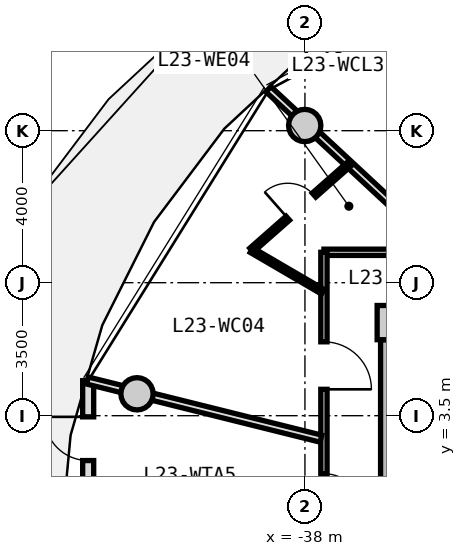
"""IFC4 building model, lengths in metres.
Left out: names, types, materials, properties, quantities, classifications, styles, units other than length and angle.
Written with IfcOpenShell. Run it as: python <this file> out.ifc"""

import sys

from ifc_helpers import new_model, si_unit, direction, frame, frame_2d, origin, origin_2d, place, context, subcontext, project, spatial, rectangle, circle, extrude, source, transform, mapped, element, fill, save


model = new_model("IFC4")
c1 = context("Model", 3, precision=1e-05, world=origin(), true_north=direction((0.0, 1.0)))
c2 = subcontext(c1, "Body", "Model", "MODEL_VIEW")
j1 = project(units=[si_unit("LENGTHUNIT", "METRE"), si_unit("PLANEANGLEUNIT", "RADIAN")], contexts=[c1])
p1 = place(None, origin())
s1 = spatial("IfcSite", under=j1, at=p1, CompositionType="ELEMENT")
p2 = place(p1, origin())
s2 = spatial("IfcBuilding", under=s1, at=p2, CompositionType="ELEMENT")
p3 = place(p2, frame((0.0, 0.0, 77.95)))
s3 = spatial("IfcBuildingStorey", under=s2, at=p3, CompositionType="ELEMENT", Elevation=77.95)
m1 = source(origin(), c2, "Body", "SweptSolid", [
    extrude(rectangle(XDim=0.9, YDim=0.9, at=origin_2d()), origin(), (0.0, 0.0, 1.0), 3.05),
])
p4 = place(p3, frame((-35.65, 5.95, 0.0), z_axis=(0.0, 0.0, 1.0), x_axis=(1.0, 0.0, 0.0)))
e1 = element("IfcColumn", 1, at=p4, inside=s3, PredefinedType="COLUMN", context=c2, shape_type="MappedRepresentation", body=[
    mapped(m1, transform((0.0, 0.0, 0.0), x_axis=(1.0, 0.0, 0.0), y_axis=(0.0, 1.0, 0.0), z_axis=(0.0, 0.0, 1.0), scale=1.0)),
])
m2 = source(origin(), c2, "Body", "SweptSolid", [
    extrude(rectangle(XDim=11.0, YDim=0.72, at=frame_2d((5.5, 0.0))), origin(), (0.0, 0.0, 1.0), 2.79),
])
p5 = place(p3, frame((-35.65, -5.5, 0.0), z_axis=(0.0, 0.0, 1.0), x_axis=(0.0, 1.0, 0.0)))
e2 = element("IfcWall", 2, at=p5, inside=s3, PredefinedType="SHEAR", context=c2, shape_type="MappedRepresentation", body=[
    mapped(m2, transform((0.0, 0.0, 0.0), x_axis=(1.0, 0.0, 0.0), y_axis=(0.0, 1.0, 0.0), z_axis=(0.0, 0.0, 1.0), scale=1.0)),
])
p6 = place(p5, frame((3.8, 0.0, 0.0)))
e3 = element("IfcOpeningElement", 3, at=p6, cuts=e2, PredefinedType="OPENING", context=c2, shape_type="SweptSolid", body=[
    extrude(rectangle(XDim=1.2, YDim=2.15, at=frame_2d((0.6, 1.075))), frame((0.0, 0.37, 0.0), z_axis=(0.0, -1.0, 0.0), x_axis=(1.0, 0.0, 0.0)), (0.0, 0.0, 1.0), 0.74),
])
m3 = source(origin(), c2, "Body", "SweptSolid", [
    extrude(circle(Radius=0.425, at=origin_2d()), origin(), (0.0, 0.0, 1.0), 3.47),
])
for number, where, z_axis, x_axis in (
    (4, (-38.006, 11.137, -0.42), (0.0, 0.0, 1.0), (1.0, 0.0, 0.0)),
    (5, (-42.419, 4.076, -0.42), (0.0, 0.0, 1.0), (1.0, 0.0, 0.0)),
):
    element("IfcColumn", number, at=place(p3, frame(where, z_axis=z_axis, x_axis=x_axis)), inside=s3, PredefinedType="COLUMN", context=c2, shape_type="MappedRepresentation", body=[
        mapped(m3, transform((0.0, 0.0, 0.0), x_axis=(1.0, 0.0, 0.0), y_axis=(0.0, 1.0, 0.0), z_axis=(0.0, 0.0, 1.0), scale=1.0)),
    ])
m4 = source(origin(), c2, "Body", "SweptSolid", [
    extrude(rectangle(XDim=8.841, YDim=0.29, at=frame_2d((4.421, 0.0))), origin(), (0.0, 0.0, 1.0), 2.79),
])
p7 = place(p3, frame((-43.704, -4.421, 0.0), z_axis=(0.0, 0.0, 1.0), x_axis=(0.0, 1.0, 0.0)))
e6 = element("IfcWall", 6, at=p7, inside=s3, PredefinedType="SOLIDWALL", context=c2, shape_type="MappedRepresentation", body=[
    mapped(m4, transform((0.0, 0.0, 0.0), x_axis=(1.0, 0.0, 0.0), y_axis=(0.0, 1.0, 0.0), z_axis=(0.0, 0.0, 1.0), scale=1.0)),
])
p8 = place(p7, frame((6.74, 0.0, 0.0)))
e7 = element("IfcOpeningElement", 7, at=p8, cuts=e6, PredefinedType="OPENING", context=c2, shape_type="SweptSolid", body=[
    extrude(rectangle(XDim=1.15, YDim=2.25, at=frame_2d((0.575, 1.125))), frame((0.0, 0.155, 0.0), z_axis=(0.0, -1.0, 0.0), x_axis=(1.0, 0.0, 0.0)), (0.0, 0.0, 1.0), 0.31),
])
p9 = place(p7, frame((0.85, 0.0, 0.85)))
e8 = element("IfcOpeningElement", 8, at=p9, cuts=e6, PredefinedType="OPENING", context=c2, shape_type="SweptSolid", body=[
    extrude(rectangle(XDim=1.2, YDim=1.5, at=frame_2d((0.6, 0.75))), frame((0.0, 0.155, 0.0), z_axis=(0.0, -1.0, 0.0), x_axis=(1.0, 0.0, 0.0)), (0.0, 0.0, 1.0), 0.31),
])
m5 = source(origin(), c2, "Body", "SweptSolid", [
    extrude(rectangle(XDim=19.0, YDim=0.165, at=frame_2d((9.5, 0.0))), origin(), (0.0, 0.0, 1.0), 2.775),
])
p10 = place(p3, frame((-37.5, 7.8, 0.0), z_axis=(0.0, 0.0, 1.0), x_axis=(1.0, 0.0, 0.0)))
e9 = element("IfcWall", 9, at=p10, inside=s3, PredefinedType="PARTITIONING", context=c2, shape_type="MappedRepresentation", body=[
    mapped(m5, transform((0.0, 0.0, 0.0), x_axis=(1.0, 0.0, 0.0), y_axis=(0.0, 1.0, 0.0), z_axis=(0.0, 0.0, 1.0), scale=1.0)),
])
p11 = place(p10, frame((15.644, 0.0, 0.0)))
e10 = element("IfcOpeningElement", 10, at=p11, cuts=e9, PredefinedType="OPENING", context=c2, shape_type="SweptSolid", body=[
    extrude(rectangle(XDim=1.25, YDim=2.2, at=frame_2d((0.625, 1.1))), frame((0.0, 0.093, 0.0), z_axis=(0.0, -1.0, 0.0), x_axis=(1.0, 0.0, 0.0)), (0.0, 0.0, 1.0), 0.185),
])
p12 = place(p10, frame((11.402, 0.0, 0.0)))
e11 = element("IfcOpeningElement", 11, at=p12, cuts=e9, PredefinedType="OPENING", context=c2, shape_type="SweptSolid", body=[
    extrude(rectangle(XDim=1.05, YDim=2.15, at=frame_2d((0.525, 1.075))), frame((0.0, 0.093, 0.0), z_axis=(0.0, -1.0, 0.0), x_axis=(1.0, 0.0, 0.0)), (0.0, 0.0, 1.0), 0.185),
])
p13 = place(p10, frame((9.857, 0.0, 0.0)))
e12 = element("IfcOpeningElement", 12, at=p13, cuts=e9, PredefinedType="OPENING", context=c2, shape_type="SweptSolid", body=[
    extrude(rectangle(XDim=1.05, YDim=2.15, at=frame_2d((0.525, 1.075))), frame((0.0, 0.093, 0.0), z_axis=(0.0, -1.0, 0.0), x_axis=(1.0, 0.0, 0.0)), (0.0, 0.0, 1.0), 0.185),
])
p14 = place(p10, frame((6.826, 0.0, 0.0)))
e13 = element("IfcOpeningElement", 13, at=p14, cuts=e9, PredefinedType="OPENING", context=c2, shape_type="SweptSolid", body=[
    extrude(rectangle(XDim=1.05, YDim=2.15, at=frame_2d((0.525, 1.075))), frame((0.0, 0.093, 0.0), z_axis=(0.0, -1.0, 0.0), x_axis=(1.0, 0.0, 0.0)), (0.0, 0.0, 1.0), 0.185),
])
p15 = place(p10, frame((4.307, 0.0, 0.0)))
e14 = element("IfcOpeningElement", 14, at=p15, cuts=e9, PredefinedType="OPENING", context=c2, shape_type="SweptSolid", body=[
    extrude(rectangle(XDim=1.05, YDim=2.15, at=frame_2d((0.525, 1.075))), frame((0.0, 0.093, 0.0), z_axis=(0.0, -1.0, 0.0), x_axis=(1.0, 0.0, 0.0)), (0.0, 0.0, 1.0), 0.185),
])
m6 = source(origin(), c2, "Body", "SweptSolid", [
    extrude(rectangle(XDim=15.6, YDim=0.165, at=frame_2d((7.8, 0.0))), origin(), (0.0, 0.0, 1.0), 2.775),
])
p16 = place(p3, frame((-37.5, -7.8, 0.0), z_axis=(0.0, 0.0, 1.0), x_axis=(0.0, 1.0, 0.0)))
e15 = element("IfcWall", 15, at=p16, inside=s3, PredefinedType="PARTITIONING", context=c2, shape_type="MappedRepresentation", body=[
    mapped(m6, transform((0.0, 0.0, 0.0), x_axis=(1.0, 0.0, 0.0), y_axis=(0.0, 1.0, 0.0), z_axis=(0.0, 0.0, 1.0), scale=1.0)),
])
p17 = place(p16, frame((11.994, 0.0, 0.0)))
e16 = element("IfcOpeningElement", 16, at=p17, cuts=e15, PredefinedType="OPENING", context=c2, shape_type="SweptSolid", body=[
    extrude(rectangle(XDim=1.25, YDim=2.2, at=frame_2d((0.625, 1.1))), frame((0.0, 0.093, 0.0), z_axis=(0.0, -1.0, 0.0), x_axis=(1.0, 0.0, 0.0)), (0.0, 0.0, 1.0), 0.185),
])
p18 = place(p16, frame((8.723, 0.0, 0.0)))
e17 = element("IfcOpeningElement", 17, at=p18, cuts=e15, PredefinedType="OPENING", context=c2, shape_type="SweptSolid", body=[
    extrude(rectangle(XDim=1.05, YDim=2.15, at=frame_2d((0.525, 1.075))), frame((0.0, 0.093, 0.0), z_axis=(0.0, -1.0, 0.0), x_axis=(1.0, 0.0, 0.0)), (0.0, 0.0, 1.0), 0.185),
])
p19 = place(p16, frame((5.777, 0.0, 0.0)))
e18 = element("IfcOpeningElement", 18, at=p19, cuts=e15, PredefinedType="OPENING", context=c2, shape_type="SweptSolid", body=[
    extrude(rectangle(XDim=1.05, YDim=2.15, at=frame_2d((0.525, 1.075))), frame((0.0, 0.093, 0.0), z_axis=(0.0, -1.0, 0.0), x_axis=(1.0, 0.0, 0.0)), (0.0, 0.0, 1.0), 0.185),
])
p20 = place(p16, frame((2.676, 0.0, 0.0)))
e19 = element("IfcOpeningElement", 19, at=p20, cuts=e15, PredefinedType="OPENING", context=c2, shape_type="SweptSolid", body=[
    extrude(rectangle(XDim=1.05, YDim=2.15, at=frame_2d((0.525, 1.075))), frame((0.0, 0.093, 0.0), z_axis=(0.0, -1.0, 0.0), x_axis=(1.0, 0.0, 0.0)), (0.0, 0.0, 1.0), 0.185),
])
m7 = source(origin(), c2, "Body", "SweptSolid", [
    extrude(rectangle(XDim=6.187, YDim=0.19, at=frame_2d((3.093, 0.0))), origin(), (0.0, 0.0, 1.0), 2.275),
])
p21 = place(p3, frame((-34.429, 7.88, 0.0), z_axis=(0.0, 0.0, 1.0), x_axis=(-0.732501077882, 0.680765870841, 0.0)))
e20 = element("IfcWall", 20, at=p21, inside=s3, PredefinedType="PARTITIONING", context=c2, shape_type="MappedRepresentation", body=[
    mapped(m7, transform((0.0, 0.0, 0.0), x_axis=(1.0, 0.0, 0.0), y_axis=(0.0, 1.0, 0.0), z_axis=(0.0, 0.0, 1.0), scale=1.0)),
])
m8 = source(origin(), c2, "Body", "SweptSolid", [
    extrude(rectangle(XDim=6.331, YDim=0.19, at=frame_2d((3.165, 0.0))), origin(), (0.0, 0.0, 1.0), 2.275),
])
p22 = place(p3, frame((-37.58, 2.896, 0.0), z_axis=(0.0, 0.0, 1.0), x_axis=(-0.97036440661, 0.241646267062, 0.0)))
e21 = element("IfcWall", 21, at=p22, inside=s3, PredefinedType="PARTITIONING", context=c2, shape_type="MappedRepresentation", body=[
    mapped(m8, transform((0.0, 0.0, 0.0), x_axis=(1.0, 0.0, 0.0), y_axis=(0.0, 1.0, 0.0), z_axis=(0.0, 0.0, 1.0), scale=1.0)),
])
m9 = source(origin(), c2, "Body", "SweptSolid", [
    extrude(rectangle(XDim=2.172, YDim=0.14, at=frame_2d((1.086, 0.0))), origin(), (0.0, 0.0, 1.0), 2.775),
])
p23 = place(p3, frame((-37.53, 6.762, 0.0), z_axis=(0.0, 0.0, 1.0), x_axis=(-0.863562702562, 0.504241468688, 0.0)))
e22 = element("IfcWall", 22, at=p23, inside=s3, PredefinedType="PARTITIONING", context=c2, shape_type="MappedRepresentation", body=[
    mapped(m9, transform((0.0, 0.0, 0.0), x_axis=(1.0, 0.0, 0.0), y_axis=(0.0, 1.0, 0.0), z_axis=(0.0, 0.0, 1.0), scale=1.0)),
])
m10 = source(origin(), c2, "Body", "SweptSolid", [
    extrude(rectangle(XDim=3.462, YDim=0.14, at=frame_2d((1.731, 0.0))), origin(), (0.0, 0.0, 1.0), 2.775),
])
p24 = place(p3, frame((-39.405, 7.857, 0.0), z_axis=(0.0, 0.0, 1.0), x_axis=(0.75036232563, 0.661026762148, 0.0)))
e23 = element("IfcWall", 23, at=p24, inside=s3, PredefinedType="PARTITIONING", context=c2, shape_type="MappedRepresentation", body=[
    mapped(m10, transform((0.0, 0.0, 0.0), x_axis=(1.0, 0.0, 0.0), y_axis=(0.0, 1.0, 0.0), z_axis=(0.0, 0.0, 1.0), scale=1.0)),
])
p25 = place(p24, frame((1.271, 0.0, 0.0)))
e24 = element("IfcOpeningElement", 24, at=p25, cuts=e23, PredefinedType="OPENING", context=c2, shape_type="SweptSolid", body=[
    extrude(rectangle(XDim=0.92, YDim=2.1, at=frame_2d((0.46, 1.05))), frame((0.0, 0.08, 0.0), z_axis=(0.0, -1.0, 0.0), x_axis=(1.0, 0.0, 0.0)), (0.0, 0.0, 1.0), 0.16),
])
m11 = source(origin(), c2, "Body", "SweptSolid", [
    extrude(rectangle(XDim=1.15, YDim=2.25, at=frame_2d((0.575, 1.125))), frame((0.0, 0.025, 0.0), z_axis=(0.0, -1.0, 0.0), x_axis=(1.0, 0.0, 0.0)), (0.0, 0.0, 1.0), 0.05),
])
p26 = place(p8, origin())
e25 = element("IfcDoor", 25, at=p26, inside=s3, OperationType="SINGLE_SWING_RIGHT", PredefinedType="DOOR", context=c2, shape_type="MappedRepresentation", body=[
    mapped(m11, transform((0.0, 0.0, 0.0), x_axis=(1.0, 0.0, 0.0), y_axis=(0.0, 1.0, 0.0), z_axis=(0.0, 0.0, 1.0), scale=1.0)),
])
fill(e7, e25)
m12 = source(origin(), c2, "Body", "SweptSolid", [
    extrude(rectangle(XDim=1.25, YDim=2.2, at=frame_2d((0.625, 1.1))), frame((0.0, 0.025, 0.0), z_axis=(0.0, -1.0, 0.0), x_axis=(1.0, 0.0, 0.0)), (0.0, 0.0, 1.0), 0.05),
])
p27 = place(p17, frame((1.25, 0.0, 0.0), z_axis=(0.0, 0.0, 1.0), x_axis=(-1.0, 0.0, 0.0)))
e26 = element("IfcDoor", 26, at=p27, inside=s3, OperationType="SINGLE_SWING_RIGHT", PredefinedType="DOOR", context=c2, shape_type="MappedRepresentation", body=[
    mapped(m12, transform((0.0, 0.0, 0.0), x_axis=(1.0, 0.0, 0.0), y_axis=(0.0, 1.0, 0.0), z_axis=(0.0, 0.0, 1.0), scale=1.0)),
])
fill(e16, e26)
m13 = source(origin(), c2, "Body", "SweptSolid", [
    extrude(rectangle(XDim=0.92, YDim=2.1, at=frame_2d((0.46, 1.05))), frame((0.0, 0.025, 0.0), z_axis=(0.0, -1.0, 0.0), x_axis=(1.0, 0.0, 0.0)), (0.0, 0.0, 1.0), 0.05),
])
p28 = place(p25, origin())
e27 = element("IfcDoor", 27, at=p28, inside=s3, OperationType="SINGLE_SWING_LEFT", PredefinedType="DOOR", context=c2, shape_type="MappedRepresentation", body=[
    mapped(m13, transform((0.0, 0.0, 0.0), x_axis=(1.0, 0.0, 0.0), y_axis=(0.0, 1.0, 0.0), z_axis=(0.0, 0.0, 1.0), scale=1.0)),
])
fill(e24, e27)
m14 = source(origin(), c2, "Body", "SweptSolid", [
    extrude(rectangle(XDim=1.05, YDim=2.15, at=frame_2d((0.525, 1.075))), frame((0.0, 0.025, 0.0), z_axis=(0.0, -1.0, 0.0), x_axis=(1.0, 0.0, 0.0)), (0.0, 0.0, 1.0), 0.05),
])
p29 = place(p18, frame((1.05, 0.0, 0.0), z_axis=(0.0, 0.0, 1.0), x_axis=(-1.0, 0.0, 0.0)))
e28 = element("IfcDoor", 28, at=p29, inside=s3, OperationType="SINGLE_SWING_RIGHT", PredefinedType="DOOR", context=c2, shape_type="MappedRepresentation", body=[
    mapped(m14, transform((0.0, 0.0, 0.0), x_axis=(1.0, 0.0, 0.0), y_axis=(0.0, 1.0, 0.0), z_axis=(0.0, 0.0, 1.0), scale=1.0)),
])
fill(e17, e28)
save(model, sys.argv[1])
